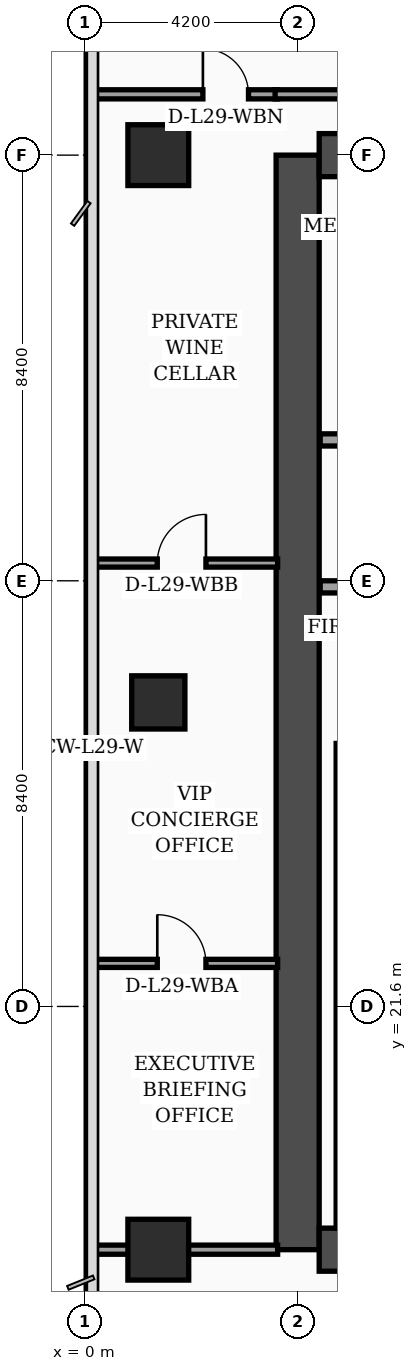
"""IFC4 building model, lengths in metres.
Left out: names, types, materials, properties, quantities, classifications, styles, units other than length and angle.
Written with IfcOpenShell. Run it as: python <this file> out.ifc"""

import sys

from ifc_helpers import new_model, si_unit, direction, frame, frame_2d, origin, origin_2d, place, context, subcontext, project, spatial, rectangle, extrude, element, fill, save


model = new_model("IFC4")
c1 = context("Model", 3, precision=1e-05, world=origin(), true_north=direction((0.0, 1.0)))
c2 = subcontext(c1, "Body", "Model", "MODEL_VIEW")
j1 = project(units=[si_unit("LENGTHUNIT", "METRE"), si_unit("PLANEANGLEUNIT", "RADIAN")], contexts=[c1])
p1 = place(None, origin())
s1 = spatial("IfcSite", under=j1, at=p1, CompositionType="ELEMENT")
p2 = place(p1, origin())
s2 = spatial("IfcBuilding", under=s1, at=p2, CompositionType="ELEMENT")
p3 = place(p2, frame((0.0, 0.0, 120.2)))
s3 = spatial("IfcBuildingStorey", under=s2, at=p3, CompositionType="ELEMENT", Elevation=120.2)
p4 = place(p3, frame((4.2, 16.8, 0.0), z_axis=(0.0, 0.0, 1.0), x_axis=(0.0, 1.0, 0.0)))
e1 = element("IfcWall", 1, at=p4, inside=s3, PredefinedType="SHEAR", context=c2, shape_type="SweptSolid", body=[
    extrude(rectangle(XDim=21.6, YDim=0.85, at=frame_2d((10.8, 0.0))), origin(), (0.0, 0.0, 1.0), 3.56),
])
for number, where, z_axis, x_axis in (
    (2, (4.625, 38.4, 0.0), (0.0, 0.0, 1.0), (1.0, 0.0, 0.0)),
    (3, (4.625, 16.8, 0.0), (0.0, 0.0, 1.0), (1.0, 0.0, 0.0)),
):
    element("IfcWall", number, at=place(p3, frame(where, z_axis=z_axis, x_axis=x_axis)), inside=s3, PredefinedType="SHEAR", context=c2, shape_type="SweptSolid", body=[
        extrude(rectangle(XDim=9.95, YDim=0.85, at=frame_2d((4.975, 0.0))), origin(), (0.0, 0.0, 1.0), 3.56),
    ])
p5 = place(p3, frame((5.08, 17.225, 0.0), z_axis=(0.0, 0.0, 1.0), x_axis=(0.0, 1.0, 0.0)))
e4 = element("IfcWall", 4, at=p5, inside=s3, PredefinedType="SOLIDWALL", context=c2, shape_type="SweptSolid", body=[
    extrude(rectangle(XDim=9.565, YDim=0.24, at=frame_2d((4.782, 0.0))), origin(), (0.0, 0.0, 1.0), 3.56),
])
p6 = place(p3, frame((1.45, 16.8, 0.0), z_axis=(0.0, 0.0, 1.0), x_axis=(1.0, 0.0, 0.0)))
e5 = element("IfcColumn", 5, at=p6, inside=s3, PredefinedType="COLUMN", context=c2, shape_type="SweptSolid", body=[
    extrude(rectangle(XDim=1.2, YDim=1.2, at=origin_2d()), origin(), (0.0, 0.0, 1.0), 3.56),
])
p7 = place(p3, frame((1.45, 27.6, 0.0), z_axis=(0.0, 0.0, 1.0), x_axis=(1.0, 0.0, 0.0)))
e6 = element("IfcColumn", 6, at=p7, inside=s3, PredefinedType="COLUMN", context=c2, shape_type="SweptSolid", body=[
    extrude(rectangle(XDim=1.05, YDim=1.05, at=origin_2d()), origin(), (0.0, 0.0, 1.0), 3.56),
])
p8 = place(p3, frame((1.45, 38.4, 0.0), z_axis=(0.0, 0.0, 1.0), x_axis=(1.0, 0.0, 0.0)))
e7 = element("IfcColumn", 7, at=p8, inside=s3, PredefinedType="COLUMN", context=c2, shape_type="SweptSolid", body=[
    extrude(rectangle(XDim=1.2, YDim=1.2, at=origin_2d()), origin(), (0.0, 0.0, 1.0), 3.56),
])
p9 = place(p3, frame((4.645, 29.88, 0.0), z_axis=(0.0, 0.0, 1.0), x_axis=(1.0, 0.0, 0.0)))
e8 = element("IfcWall", 8, at=p9, inside=s3, PredefinedType="SOLIDWALL", context=c2, shape_type="SweptSolid", body=[
    extrude(rectangle(XDim=4.775, YDim=0.24, at=frame_2d((2.387, 0.0))), origin(), (0.0, 0.0, 1.0), 3.56),
])
p10 = place(p9, frame((0.45, 0.0, 0.0)))
e9 = element("IfcOpeningElement", 9, at=p10, cuts=e8, PredefinedType="OPENING", context=c2, shape_type="SweptSolid", body=[
    extrude(rectangle(XDim=1.3, YDim=2.35, at=frame_2d((0.65, 1.175))), frame((0.0, 0.13, 0.0), z_axis=(0.0, -1.0, 0.0), x_axis=(1.0, 0.0, 0.0)), (0.0, 0.0, 1.0), 0.26),
])
p11 = place(p3, frame((4.645, 32.78, 0.0), z_axis=(0.0, 0.0, 1.0), x_axis=(1.0, 0.0, 0.0)))
e10 = element("IfcWall", 10, at=p11, inside=s3, PredefinedType="SOLIDWALL", context=c2, shape_type="SweptSolid", body=[
    extrude(rectangle(XDim=4.775, YDim=0.24, at=frame_2d((2.387, 0.0))), origin(), (0.0, 0.0, 1.0), 3.19),
])
p12 = place(p3, frame((0.08, 22.45, 0.0), z_axis=(0.0, 0.0, 1.0), x_axis=(1.0, 0.0, 0.0)))
e11 = element("IfcWall", 11, at=p12, inside=s3, PredefinedType="PARTITIONING", context=c2, shape_type="SweptSolid", body=[
    extrude(rectangle(XDim=3.725, YDim=0.16, at=frame_2d((1.862, 0.0))), origin(), (0.0, 0.0, 1.0), 3.04),
])
p13 = place(p12, frame((1.35, 0.0, 0.0)))
e12 = element("IfcOpeningElement", 12, at=p13, cuts=e11, PredefinedType="OPENING", context=c2, shape_type="SweptSolid", body=[
    extrude(rectangle(XDim=0.96, YDim=2.2, at=frame_2d((0.48, 1.1))), frame((0.0, 0.09, 0.0), z_axis=(0.0, -1.0, 0.0), x_axis=(1.0, 0.0, 0.0)), (0.0, 0.0, 1.0), 0.18),
])
p14 = place(p3, frame((0.08, 30.35, 0.0), z_axis=(0.0, 0.0, 1.0), x_axis=(1.0, 0.0, 0.0)))
e13 = element("IfcWall", 13, at=p14, inside=s3, PredefinedType="PARTITIONING", context=c2, shape_type="SweptSolid", body=[
    extrude(rectangle(XDim=3.725, YDim=0.16, at=frame_2d((1.862, 0.0))), origin(), (0.0, 0.0, 1.0), 3.04),
])
p15 = place(p14, frame((1.35, 0.0, 0.0)))
e14 = element("IfcOpeningElement", 14, at=p15, cuts=e13, PredefinedType="OPENING", context=c2, shape_type="SweptSolid", body=[
    extrude(rectangle(XDim=0.96, YDim=2.2, at=frame_2d((0.48, 1.1))), frame((0.0, 0.09, 0.0), z_axis=(0.0, -1.0, 0.0), x_axis=(1.0, 0.0, 0.0)), (0.0, 0.0, 1.0), 0.18),
])
p16 = place(p3, frame((0.08, 16.8, 0.0), z_axis=(0.0, 0.0, 1.0), x_axis=(1.0, 0.0, 0.0)))
e15 = element("IfcWall", 15, at=p16, inside=s3, PredefinedType="PARTITIONING", context=c2, shape_type="SweptSolid", body=[
    extrude(rectangle(XDim=3.725, YDim=0.18, at=frame_2d((1.862, 0.0))), origin(), (0.0, 0.0, 1.0), 2.84),
])
p17 = place(p3, frame((0.08, 39.6, 0.0), z_axis=(0.0, 0.0, 1.0), x_axis=(1.0, 0.0, 0.0)))
e16 = element("IfcWall", 16, at=p17, inside=s3, PredefinedType="PARTITIONING", context=c2, shape_type="SweptSolid", body=[
    extrude(rectangle(XDim=3.725, YDim=0.18, at=frame_2d((1.862, 0.0))), origin(), (0.0, 0.0, 1.0), 2.84),
])
p18 = place(p17, frame((2.25, 0.0, 0.0)))
e17 = element("IfcOpeningElement", 17, at=p18, cuts=e16, PredefinedType="OPENING", context=c2, shape_type="SweptSolid", body=[
    extrude(rectangle(XDim=0.9, YDim=2.15, at=frame_2d((0.45, 1.075))), frame((0.0, 0.1, 0.0), z_axis=(0.0, -1.0, 0.0), x_axis=(1.0, 0.0, 0.0)), (0.0, 0.0, 1.0), 0.2),
])
p19 = place(p3, frame((3.755, 39.6, 0.0), z_axis=(0.0, 0.0, 1.0), x_axis=(1.0, 0.0, 0.0)))
e18 = element("IfcWall", 18, at=p19, inside=s3, PredefinedType="PARTITIONING", context=c2, shape_type="SweptSolid", body=[
    extrude(rectangle(XDim=11.395, YDim=0.18, at=frame_2d((5.698, 0.0))), origin(), (0.0, 0.0, 1.0), 2.84),
])
p20 = place(p13, origin())
e19 = element("IfcDoor", 19, at=p20, inside=s3, OperationType="SINGLE_SWING_LEFT", PredefinedType="DOOR", context=c2, shape_type="SweptSolid", body=[
    extrude(rectangle(XDim=0.96, YDim=2.2, at=frame_2d((0.48, 1.1))), frame((0.0, 0.025, 0.0), z_axis=(0.0, -1.0, 0.0), x_axis=(1.0, 0.0, 0.0)), (0.0, 0.0, 1.0), 0.05),
])
fill(e12, e19)
p21 = place(p15, origin())
e20 = element("IfcDoor", 20, at=p21, inside=s3, OperationType="SINGLE_SWING_RIGHT", PredefinedType="DOOR", context=c2, shape_type="SweptSolid", body=[
    extrude(rectangle(XDim=0.96, YDim=2.2, at=frame_2d((0.48, 1.1))), frame((0.0, 0.025, 0.0), z_axis=(0.0, -1.0, 0.0), x_axis=(1.0, 0.0, 0.0)), (0.0, 0.0, 1.0), 0.05),
])
fill(e14, e20)
p22 = place(p18, origin())
e21 = element("IfcDoor", 21, at=p22, inside=s3, OperationType="SINGLE_SWING_LEFT", PredefinedType="DOOR", context=c2, shape_type="SweptSolid", body=[
    extrude(rectangle(XDim=0.9, YDim=2.15, at=frame_2d((0.45, 1.075))), frame((0.0, 0.025, 0.0), z_axis=(0.0, -1.0, 0.0), x_axis=(1.0, 0.0, 0.0)), (0.0, 0.0, 1.0), 0.05),
])
fill(e17, e21)
save(model, sys.argv[1])
